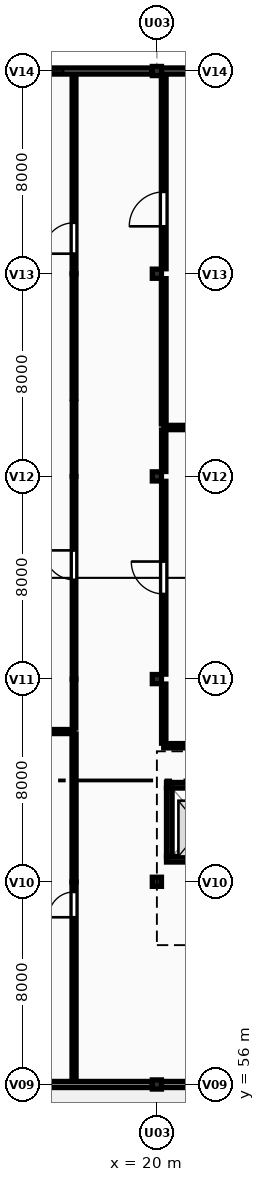
"""IFC4 building model, lengths in metres.
Left out: names, types, materials, properties, quantities, classifications, styles, units other than length and angle.
Written with IfcOpenShell. Run it as: python <this file> out.ifc"""

import sys

from ifc_helpers import new_model, si_unit, direction, frame, frame_2d, origin, origin_2d, place, context, subcontext, project, spatial, rectangle, extrude, element, fill, save


model = new_model("IFC4")
c1 = context("Model", 3, precision=1e-05, world=origin(), true_north=direction((0.0, 1.0)))
c2 = subcontext(c1, "Body", "Model", "MODEL_VIEW")
j1 = project(units=[si_unit("LENGTHUNIT", "METRE"), si_unit("PLANEANGLEUNIT", "RADIAN")], contexts=[c1])
p1 = place(None, origin())
s1 = spatial("IfcSite", under=j1, at=p1, CompositionType="ELEMENT")
p2 = place(p1, origin())
s2 = spatial("IfcBuilding", under=s1, at=p2, CompositionType="ELEMENT")
p3 = place(p2, frame((0.0, 0.0, 12.3)))
s3 = spatial("IfcBuildingStorey", under=s2, at=p3, CompositionType="ELEMENT", Elevation=12.3)
p4 = place(p3, frame((20.0, 56.0, 0.0), z_axis=(0.0, 0.0, 1.0), x_axis=(1.0, 0.0, 0.0)))
e1 = element("IfcColumn", 1, at=p4, inside=s3, PredefinedType="COLUMN", context=c2, shape_type="SweptSolid", body=[
    extrude(rectangle(XDim=0.36, YDim=0.36, at=origin_2d()), origin(), (0.0, 0.0, 1.0), 5.977),
])
p5 = place(p3, frame((20.0, 64.0, 0.0), z_axis=(0.0, 0.0, 1.0), x_axis=(1.0, 0.0, 0.0)))
e2 = element("IfcColumn", 2, at=p5, inside=s3, PredefinedType="COLUMN", context=c2, shape_type="SweptSolid", body=[
    extrude(rectangle(XDim=0.36, YDim=0.36, at=origin_2d()), origin(), (0.0, 0.0, 1.0), 5.448),
])
p6 = place(p3, frame((20.0, 72.0, 0.0), z_axis=(0.0, 0.0, 1.0), x_axis=(1.0, 0.0, 0.0)))
e3 = element("IfcColumn", 3, at=p6, inside=s3, PredefinedType="COLUMN", context=c2, shape_type="SweptSolid", body=[
    extrude(rectangle(XDim=0.36, YDim=0.36, at=origin_2d()), origin(), (0.0, 0.0, 1.0), 4.918),
])
p7 = place(p3, frame((20.0, 80.0, 0.0), z_axis=(0.0, 0.0, 1.0), x_axis=(1.0, 0.0, 0.0)))
e4 = element("IfcColumn", 4, at=p7, inside=s3, PredefinedType="COLUMN", context=c2, shape_type="SweptSolid", body=[
    extrude(rectangle(XDim=0.36, YDim=0.36, at=origin_2d()), origin(), (0.0, 0.0, 1.0), 4.928),
])
p8 = place(p3, frame((20.0, 88.0, 0.0), z_axis=(0.0, 0.0, 1.0), x_axis=(1.0, 0.0, 0.0)))
e5 = element("IfcColumn", 5, at=p8, inside=s3, PredefinedType="COLUMN", context=c2, shape_type="SweptSolid", body=[
    extrude(rectangle(XDim=0.36, YDim=0.36, at=origin_2d()), origin(), (0.0, 0.0, 1.0), 5.477),
])
p9 = place(p3, frame((20.0, 96.0, 0.0), z_axis=(0.0, 0.0, 1.0), x_axis=(1.0, 0.0, 0.0)))
e6 = element("IfcColumn", 6, at=p9, inside=s3, PredefinedType="COLUMN", context=c2, shape_type="SweptSolid", body=[
    extrude(rectangle(XDim=0.36, YDim=0.36, at=origin_2d()), origin(), (0.0, 0.0, 1.0), 6.026),
])
p10 = place(p3, frame((12.18, 96.0, 0.0), z_axis=(0.0, 0.0, 1.0), x_axis=(1.0, 0.0, 0.0)))
e7 = element("IfcWall", 7, at=p10, inside=s3, PredefinedType="SOLIDWALL", context=c2, shape_type="SweptSolid", body=[
    extrude(rectangle(XDim=7.64, YDim=0.24, at=frame_2d((3.82, 0.0))), origin(), (0.0, 0.0, 1.0), 5.444),
])
p11 = place(p10, frame((2.62, 0.0, 0.95)))
e8 = element("IfcOpeningElement", 8, at=p11, cuts=e7, PredefinedType="OPENING", context=c2, shape_type="SweptSolid", body=[
    extrude(rectangle(XDim=1.5, YDim=1.35, at=frame_2d((0.75, 0.675))), frame((0.0, 0.13, 0.0), z_axis=(0.0, -1.0, 0.0), x_axis=(1.0, 0.0, 0.0)), (0.0, 0.0, 1.0), 0.26),
])
p12 = place(p3, frame((20.18, 96.0, 0.0), z_axis=(0.0, 0.0, 1.0), x_axis=(1.0, 0.0, 0.0)))
e9 = element("IfcWall", 9, at=p12, inside=s3, PredefinedType="SOLIDWALL", context=c2, shape_type="SweptSolid", body=[
    extrude(rectangle(XDim=7.64, YDim=0.24, at=frame_2d((3.82, 0.0))), origin(), (0.0, 0.0, 1.0), 5.103),
])
p13 = place(p12, frame((2.92, 0.0, 0.95)))
e10 = element("IfcOpeningElement", 10, at=p13, cuts=e9, PredefinedType="OPENING", context=c2, shape_type="SweptSolid", body=[
    extrude(rectangle(XDim=1.8, YDim=1.35, at=frame_2d((0.9, 0.675))), frame((0.0, 0.13, 0.0), z_axis=(0.0, -1.0, 0.0), x_axis=(1.0, 0.0, 0.0)), (0.0, 0.0, 1.0), 0.26),
])
p14 = place(p3, frame((27.82, 56.0, 0.0), z_axis=(0.0, 0.0, 1.0), x_axis=(-1.0, 0.0, 0.0)))
e11 = element("IfcWall", 11, at=p14, inside=s3, PredefinedType="SOLIDWALL", context=c2, shape_type="SweptSolid", body=[
    extrude(rectangle(XDim=7.64, YDim=0.24, at=frame_2d((3.82, 0.0))), origin(), (0.0, 0.0, 1.0), 5.054),
])
p15 = place(p14, frame((3.22, 0.0, 0.95)))
e12 = element("IfcOpeningElement", 12, at=p15, cuts=e11, PredefinedType="OPENING", context=c2, shape_type="SweptSolid", body=[
    extrude(rectangle(XDim=1.2, YDim=1.2, at=frame_2d((0.6, 0.6))), frame((0.0, 0.13, 0.0), z_axis=(0.0, -1.0, 0.0), x_axis=(1.0, 0.0, 0.0)), (0.0, 0.0, 1.0), 0.26),
])
p16 = place(p3, frame((19.82, 56.0, 0.0), z_axis=(0.0, 0.0, 1.0), x_axis=(-1.0, 0.0, 0.0)))
e13 = element("IfcWall", 13, at=p16, inside=s3, PredefinedType="SOLIDWALL", context=c2, shape_type="SweptSolid", body=[
    extrude(rectangle(XDim=7.64, YDim=0.24, at=frame_2d((3.82, 0.0))), origin(), (0.0, 0.0, 1.0), 5.395),
])
p17 = place(p3, frame((23.12, 64.89, 0.0), z_axis=(0.0, 0.0, 1.0), x_axis=(-1.0, 0.0, 0.0)))
e14 = element("IfcWall", 14, at=p17, inside=s3, PredefinedType="SHEAR", context=c2, shape_type="SweptSolid", body=[
    extrude(rectangle(XDim=2.74, YDim=0.22, at=frame_2d((1.37, 0.0))), origin(), (0.0, 0.0, 1.0), 5.806),
])
p18 = place(p17, frame((0.87, 0.0, 0.0)))
e15 = element("IfcOpeningElement", 15, at=p18, cuts=e14, PredefinedType="OPENING", context=c2, shape_type="SweptSolid", body=[
    extrude(rectangle(XDim=1.0, YDim=2.15, at=frame_2d((0.5, 1.075))), frame((0.0, 0.12, 0.0), z_axis=(0.0, -1.0, 0.0), x_axis=(1.0, 0.0, 0.0)), (0.0, 0.0, 1.0), 0.24),
])
p19 = place(p3, frame((20.38, 67.81, 0.0), z_axis=(0.0, 0.0, 1.0), x_axis=(1.0, 0.0, 0.0)))
e16 = element("IfcWall", 16, at=p19, inside=s3, PredefinedType="SHEAR", context=c2, shape_type="SweptSolid", body=[
    extrude(rectangle(XDim=2.74, YDim=0.22, at=frame_2d((1.37, 0.0))), origin(), (0.0, 0.0, 1.0), 5.806),
])
p20 = place(p3, frame((20.49, 65.0, 0.0), z_axis=(0.0, 0.0, 1.0), x_axis=(0.0, 1.0, 0.0)))
e17 = element("IfcWall", 17, at=p20, inside=s3, PredefinedType="SHEAR", context=c2, shape_type="SweptSolid", body=[
    extrude(rectangle(XDim=2.7, YDim=0.22, at=frame_2d((1.35, 0.0))), origin(), (0.0, 0.0, 1.0), 5.806),
])
p21 = place(p3, frame((12.0, 69.93, 0.0), z_axis=(0.0, 0.0, 1.0), x_axis=(1.0, 0.0, 0.0)))
e18 = element("IfcWall", 18, at=p21, inside=s3, PredefinedType="PARTITIONING", context=c2, shape_type="SweptSolid", body=[
    extrude(rectangle(XDim=4.73, YDim=0.16, at=frame_2d((2.365, 0.0))), origin(), (0.0, 0.0, 1.0), 3.65),
])
p22 = place(p3, frame((16.73, 56.162, 0.0), z_axis=(0.0, 0.0, 1.0), x_axis=(0.0, 1.0, 0.0)))
e19 = element("IfcWall", 19, at=p22, inside=s3, PredefinedType="PARTITIONING", context=c2, shape_type="SweptSolid", body=[
    extrude(rectangle(XDim=7.838, YDim=0.16, at=frame_2d((3.919, 0.0))), origin(), (0.0, 0.0, 1.0), 3.65),
])
p23 = place(p22, frame((6.438, 0.0, 0.0)))
e20 = element("IfcOpeningElement", 20, at=p23, cuts=e19, PredefinedType="OPENING", context=c2, shape_type="SweptSolid", body=[
    extrude(rectangle(XDim=1.0, YDim=2.15, at=frame_2d((0.5, 1.075))), frame((0.0, 0.09, 0.0), z_axis=(0.0, -1.0, 0.0), x_axis=(1.0, 0.0, 0.0)), (0.0, 0.0, 1.0), 0.18),
])
p24 = place(p3, frame((16.73, 64.0, 0.0), z_axis=(0.0, 0.0, 1.0), x_axis=(0.0, 1.0, 0.0)))
e21 = element("IfcWall", 21, at=p24, inside=s3, PredefinedType="PARTITIONING", context=c2, shape_type="SweptSolid", body=[
    extrude(rectangle(XDim=5.835, YDim=0.16, at=frame_2d((2.917, 0.0))), origin(), (0.0, 0.0, 1.0), 3.65),
])
p25 = place(p3, frame((16.73, 70.07, 0.0), z_axis=(0.0, 0.0, 1.0), x_axis=(0.0, 1.0, 0.0)))
e22 = element("IfcWall", 22, at=p25, inside=s3, PredefinedType="PARTITIONING", context=c2, shape_type="SweptSolid", body=[
    extrude(rectangle(XDim=1.93, YDim=0.14, at=frame_2d((0.965, 0.0))), origin(), (0.0, 0.0, 1.0), 3.65),
])
p26 = place(p3, frame((16.73, 72.0, 0.0), z_axis=(0.0, 0.0, 1.0), x_axis=(0.0, 1.0, 0.0)))
e23 = element("IfcWall", 23, at=p26, inside=s3, PredefinedType="PARTITIONING", context=c2, shape_type="SweptSolid", body=[
    extrude(rectangle(XDim=8.0, YDim=0.14, at=frame_2d((4.0, 0.0))), origin(), (0.0, 0.0, 1.0), 3.65),
])
p27 = place(p26, frame((3.92, 0.0, 0.0)))
e24 = element("IfcOpeningElement", 24, at=p27, cuts=e23, PredefinedType="OPENING", context=c2, shape_type="SweptSolid", body=[
    extrude(rectangle(XDim=1.16, YDim=2.15, at=frame_2d((0.58, 1.075))), frame((0.0, 0.08, 0.0), z_axis=(0.0, -1.0, 0.0), x_axis=(1.0, 0.0, 0.0)), (0.0, 0.0, 1.0), 0.16),
])
p28 = place(p3, frame((16.73, 80.0, 0.0), z_axis=(0.0, 0.0, 1.0), x_axis=(0.0, 1.0, 0.0)))
e25 = element("IfcWall", 25, at=p28, inside=s3, PredefinedType="PARTITIONING", context=c2, shape_type="SweptSolid", body=[
    extrude(rectangle(XDim=2.93, YDim=0.14, at=frame_2d((1.465, 0.0))), origin(), (0.0, 0.0, 1.0), 3.65),
])
p29 = place(p3, frame((16.73, 83.07, 0.0), z_axis=(0.0, 0.0, 1.0), x_axis=(0.0, 1.0, 0.0)))
e26 = element("IfcWall", 26, at=p29, inside=s3, PredefinedType="PARTITIONING", context=c2, shape_type="SweptSolid", body=[
    extrude(rectangle(XDim=4.93, YDim=0.15, at=frame_2d((2.465, 0.0))), origin(), (0.0, 0.0, 1.0), 3.65),
])
p30 = place(p3, frame((16.73, 88.0, 0.0), z_axis=(0.0, 0.0, 1.0), x_axis=(0.0, 1.0, 0.0)))
e27 = element("IfcWall", 27, at=p30, inside=s3, PredefinedType="PARTITIONING", context=c2, shape_type="SweptSolid", body=[
    extrude(rectangle(XDim=7.838, YDim=0.15, at=frame_2d((3.919, 0.0))), origin(), (0.0, 0.0, 1.0), 3.65),
])
p31 = place(p30, frame((0.79, 0.0, 0.0)))
e28 = element("IfcOpeningElement", 28, at=p31, cuts=e27, PredefinedType="OPENING", context=c2, shape_type="SweptSolid", body=[
    extrude(rectangle(XDim=1.22, YDim=2.15, at=frame_2d((0.61, 1.075))), frame((0.0, 0.085, 0.0), z_axis=(0.0, -1.0, 0.0), x_axis=(1.0, 0.0, 0.0)), (0.0, 0.0, 1.0), 0.17),
])
for number, where, z_axis, x_axis in (
    (29, (20.27, 69.37, 0.0), (0.0, 0.0, 1.0), (1.0, 0.0, 0.0)),
    (30, (20.27, 81.93, 0.0), (0.0, 0.0, 1.0), (1.0, 0.0, 0.0)),
):
    element("IfcWall", number, at=place(p3, frame(where, z_axis=z_axis, x_axis=x_axis)), inside=s3, PredefinedType="PARTITIONING", context=c2, shape_type="SweptSolid", body=[
        extrude(rectangle(XDim=7.73, YDim=0.17, at=frame_2d((3.865, 0.0))), origin(), (0.0, 0.0, 1.0), 3.65),
    ])
p32 = place(p3, frame((20.27, 69.47, 0.0), z_axis=(0.0, 0.0, 1.0), x_axis=(0.0, 1.0, 0.0)))
e31 = element("IfcWall", 31, at=p32, inside=s3, PredefinedType="PARTITIONING", context=c2, shape_type="SweptSolid", body=[
    extrude(rectangle(XDim=2.335, YDim=0.17, at=frame_2d((1.167, 0.0))), origin(), (0.0, 0.0, 1.0), 3.65),
])
p33 = place(p3, frame((20.27, 72.195, 0.0), z_axis=(0.0, 0.0, 1.0), x_axis=(0.0, 1.0, 0.0)))
e32 = element("IfcWall", 32, at=p33, inside=s3, PredefinedType="PARTITIONING", context=c2, shape_type="SweptSolid", body=[
    extrude(rectangle(XDim=7.61, YDim=0.17, at=frame_2d((3.805, 0.0))), origin(), (0.0, 0.0, 1.0), 3.65),
])
p34 = place(p33, frame((3.165, 0.0, 0.0)))
e33 = element("IfcOpeningElement", 33, at=p34, cuts=e32, PredefinedType="OPENING", context=c2, shape_type="SweptSolid", body=[
    extrude(rectangle(XDim=1.28, YDim=2.15, at=frame_2d((0.64, 1.075))), frame((0.0, 0.095, 0.0), z_axis=(0.0, -1.0, 0.0), x_axis=(1.0, 0.0, 0.0)), (0.0, 0.0, 1.0), 0.19),
])
p35 = place(p3, frame((20.27, 80.195, 0.0), z_axis=(0.0, 0.0, 1.0), x_axis=(0.0, 1.0, 0.0)))
e34 = element("IfcWall", 34, at=p35, inside=s3, PredefinedType="PARTITIONING", context=c2, shape_type="SweptSolid", body=[
    extrude(rectangle(XDim=1.635, YDim=0.17, at=frame_2d((0.817, 0.0))), origin(), (0.0, 0.0, 1.0), 3.65),
])
p36 = place(p3, frame((20.27, 82.07, 0.0), z_axis=(0.0, 0.0, 1.0), x_axis=(0.0, 1.0, 0.0)))
e35 = element("IfcWall", 35, at=p36, inside=s3, PredefinedType="PARTITIONING", context=c2, shape_type="SweptSolid", body=[
    extrude(rectangle(XDim=5.735, YDim=0.185, at=frame_2d((2.867, 0.0))), origin(), (0.0, 0.0, 1.0), 3.65),
])
p37 = place(p3, frame((20.27, 88.195, 0.0), z_axis=(0.0, 0.0, 1.0), x_axis=(0.0, 1.0, 0.0)))
e36 = element("IfcWall", 36, at=p37, inside=s3, PredefinedType="PARTITIONING", context=c2, shape_type="SweptSolid", body=[
    extrude(rectangle(XDim=7.643, YDim=0.185, at=frame_2d((3.821, 0.0))), origin(), (0.0, 0.0, 1.0), 3.65),
])
p38 = place(p37, frame((1.675, 0.0, 0.0)))
e37 = element("IfcOpeningElement", 37, at=p38, cuts=e36, PredefinedType="OPENING", context=c2, shape_type="SweptSolid", body=[
    extrude(rectangle(XDim=1.36, YDim=2.15, at=frame_2d((0.68, 1.075))), frame((0.0, 0.103, 0.0), z_axis=(0.0, -1.0, 0.0), x_axis=(1.0, 0.0, 0.0)), (0.0, 0.0, 1.0), 0.205),
])
p39 = place(p11, origin())
e38 = element("IfcWindow", 38, at=p39, inside=s3, PartitioningType="SINGLE_PANEL", PredefinedType="WINDOW", context=c2, shape_type="SweptSolid", body=[
    extrude(rectangle(XDim=1.5, YDim=1.35, at=frame_2d((0.75, 0.675))), frame((0.0, 0.03, 0.0), z_axis=(0.0, -1.0, 0.0), x_axis=(1.0, 0.0, 0.0)), (0.0, 0.0, 1.0), 0.06),
])
fill(e8, e38)
p40 = place(p23, origin())
e39 = element("IfcDoor", 39, at=p40, inside=s3, OperationType="SINGLE_SWING_LEFT", PredefinedType="DOOR", context=c2, shape_type="SweptSolid", body=[
    extrude(rectangle(XDim=1.0, YDim=2.15, at=frame_2d((0.5, 1.075))), frame((0.0, 0.025, 0.0), z_axis=(0.0, -1.0, 0.0), x_axis=(1.0, 0.0, 0.0)), (0.0, 0.0, 1.0), 0.05),
])
fill(e20, e39)
p41 = place(p27, origin())
e40 = element("IfcDoor", 40, at=p41, inside=s3, OperationType="SINGLE_SWING_RIGHT", PredefinedType="DOOR", context=c2, shape_type="SweptSolid", body=[
    extrude(rectangle(XDim=1.16, YDim=2.15, at=frame_2d((0.58, 1.075))), frame((0.0, 0.025, 0.0), z_axis=(0.0, -1.0, 0.0), x_axis=(1.0, 0.0, 0.0)), (0.0, 0.0, 1.0), 0.05),
])
fill(e24, e40)
p42 = place(p31, origin())
e41 = element("IfcDoor", 41, at=p42, inside=s3, OperationType="SINGLE_SWING_LEFT", PredefinedType="DOOR", context=c2, shape_type="SweptSolid", body=[
    extrude(rectangle(XDim=1.22, YDim=2.15, at=frame_2d((0.61, 1.075))), frame((0.0, 0.025, 0.0), z_axis=(0.0, -1.0, 0.0), x_axis=(1.0, 0.0, 0.0)), (0.0, 0.0, 1.0), 0.05),
])
fill(e28, e41)
p43 = place(p34, origin())
e42 = element("IfcDoor", 42, at=p43, inside=s3, OperationType="SINGLE_SWING_RIGHT", PredefinedType="DOOR", context=c2, shape_type="SweptSolid", body=[
    extrude(rectangle(XDim=1.28, YDim=2.15, at=frame_2d((0.64, 1.075))), frame((0.0, 0.025, 0.0), z_axis=(0.0, -1.0, 0.0), x_axis=(1.0, 0.0, 0.0)), (0.0, 0.0, 1.0), 0.05),
])
fill(e33, e42)
p44 = place(p38, origin())
e43 = element("IfcDoor", 43, at=p44, inside=s3, OperationType="SINGLE_SWING_LEFT", PredefinedType="DOOR", context=c2, shape_type="SweptSolid", body=[
    extrude(rectangle(XDim=1.36, YDim=2.15, at=frame_2d((0.68, 1.075))), frame((0.0, 0.025, 0.0), z_axis=(0.0, -1.0, 0.0), x_axis=(1.0, 0.0, 0.0)), (0.0, 0.0, 1.0), 0.05),
])
fill(e37, e43)
save(model, sys.argv[1])
